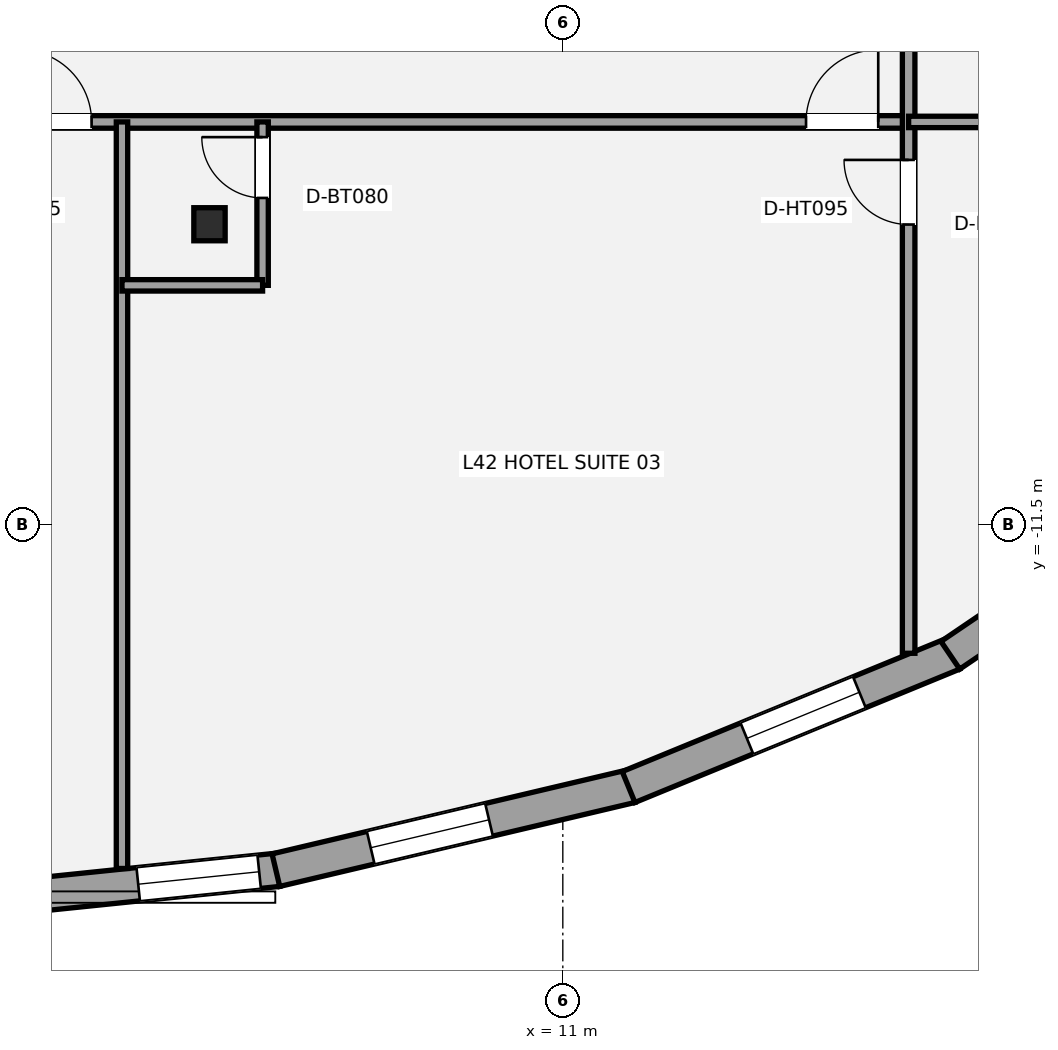
"""IFC4 building model, lengths in metres.
Left out: names, types, materials, properties, quantities, classifications, styles, units other than length and angle.
Written with IfcOpenShell. Run it as: python <this file> out.ifc"""

import sys

from ifc_helpers import new_model, si_unit, direction, frame, frame_2d, origin, origin_2d, place, context, subcontext, project, spatial, rectangle, i_section, extrude, element, fill, save


model = new_model("IFC4")
c1 = context("Model", 3, precision=1e-05, world=origin(), true_north=direction((0.0, 1.0)))
c2 = subcontext(c1, "Body", "Model", "MODEL_VIEW")
j1 = project(units=[si_unit("LENGTHUNIT", "METRE"), si_unit("PLANEANGLEUNIT", "RADIAN")], contexts=[c1])
p1 = place(None, origin())
s1 = spatial("IfcSite", under=j1, at=p1, CompositionType="ELEMENT")
p2 = place(p1, origin())
s2 = spatial("IfcBuilding", under=s1, at=p2, CompositionType="ELEMENT")
p3 = place(p2, frame((0.0, 0.0, 156.6)))
s3 = spatial("IfcBuildingStorey", under=s2, at=p3, CompositionType="ELEMENT", Elevation=156.6)
p4 = place(p3, frame((6.351, -7.546, 0.0), z_axis=(0.0, 0.0, 1.0), x_axis=(1.0, 0.0, 0.0)))
e1 = element("IfcColumn", 1, at=p4, inside=s3, PredefinedType="COLUMN", context=c2, shape_type="SweptSolid", body=[
    extrude(i_section(OverallWidth=0.412, OverallDepth=0.435, WebThickness=0.036, FlangeThickness=0.057, at=origin_2d()), origin(), (0.0, 0.0, 1.0), 3.2),
])
p5 = place(p3, frame((7.253, -16.039, 0.0), z_axis=(0.0, 0.0, 1.0), x_axis=(-0.994718319881, -0.10264240884, 0.0)))
e2 = element("IfcWall", 2, at=p5, inside=s3, PredefinedType="STANDARD", context=c2, shape_type="SweptSolid", body=[
    extrude(rectangle(XDim=4.866, YDim=0.44, at=frame_2d((2.433, 0.0))), origin(), (0.0, 0.0, 1.0), 2.315),
])
p6 = place(p5, frame((0.25, 0.0, 0.58)))
e3 = element("IfcOpeningElement", 3, at=p6, cuts=e2, PredefinedType="OPENING", context=c2, shape_type="SweptSolid", body=[
    extrude(rectangle(XDim=1.6, YDim=1.55, at=frame_2d((0.8, 0.775))), frame((0.0, 0.23, 0.0), z_axis=(0.0, -1.0, 0.0), x_axis=(1.0, 0.0, 0.0)), (0.0, 0.0, 1.0), 0.46),
])
p7 = place(p3, frame((11.898, -14.939, 0.0), z_axis=(0.0, 0.0, 1.0), x_axis=(-0.973201371538, -0.229954539936, 0.0)))
e4 = element("IfcWall", 4, at=p7, inside=s3, PredefinedType="STANDARD", context=c2, shape_type="SweptSolid", body=[
    extrude(rectangle(XDim=4.802, YDim=0.44, at=frame_2d((2.401, 0.0))), origin(), (0.0, 0.0, 1.0), 2.315),
])
p8 = place(p7, frame((1.921, 0.0, 0.58)))
e5 = element("IfcOpeningElement", 5, at=p8, cuts=e4, PredefinedType="OPENING", context=c2, shape_type="SweptSolid", body=[
    extrude(rectangle(XDim=1.6, YDim=1.55, at=frame_2d((0.8, 0.775))), frame((0.0, 0.23, 0.0), z_axis=(0.0, -1.0, 0.0), x_axis=(1.0, 0.0, 0.0)), (0.0, 0.0, 1.0), 0.46),
])
p9 = place(p3, frame((16.138, -13.195, 0.0), z_axis=(0.0, 0.0, 1.0), x_axis=(-0.925044361302, -0.3798590918, 0.0)))
e6 = element("IfcWall", 6, at=p9, inside=s3, PredefinedType="STANDARD", context=c2, shape_type="SweptSolid", body=[
    extrude(rectangle(XDim=4.619, YDim=0.44, at=frame_2d((2.31, 0.0))), origin(), (0.0, 0.0, 1.0), 2.315),
])
p10 = place(p9, frame((1.337, 0.0, 0.58)))
e7 = element("IfcOpeningElement", 7, at=p10, cuts=e6, PredefinedType="OPENING", context=c2, shape_type="SweptSolid", body=[
    extrude(rectangle(XDim=1.6, YDim=1.55, at=frame_2d((0.8, 0.775))), frame((0.0, 0.23, 0.0), z_axis=(0.0, -1.0, 0.0), x_axis=(1.0, 0.0, 0.0)), (0.0, 0.0, 1.0), 0.46),
])
p11 = place(p3, frame((19.643, -10.814, 0.0), z_axis=(0.0, 0.0, 1.0), x_axis=(-0.827771778383, -0.561064954272, 0.0)))
e8 = element("IfcWall", 8, at=p11, inside=s3, PredefinedType="STANDARD", context=c2, shape_type="SweptSolid", body=[
    extrude(rectangle(XDim=4.282, YDim=0.44, at=frame_2d((2.141, 0.0))), origin(), (0.0, 0.0, 1.0), 2.315),
])
p12 = place(p11, frame((1.837, 0.0, 0.58)))
e9 = element("IfcOpeningElement", 9, at=p12, cuts=e8, PredefinedType="OPENING", context=c2, shape_type="SweptSolid", body=[
    extrude(rectangle(XDim=1.6, YDim=1.55, at=frame_2d((0.8, 0.775))), frame((0.0, 0.23, 0.0), z_axis=(0.0, -1.0, 0.0), x_axis=(1.0, 0.0, 0.0)), (0.0, 0.0, 1.0), 0.46),
])
p13 = place(p3, frame((-15.75, -6.2, 0.0), z_axis=(0.0, 0.0, 1.0), x_axis=(1.0, 0.0, 0.0)))
e10 = element("IfcWall", 10, at=p13, inside=s3, PredefinedType="PARTITIONING", context=c2, shape_type="SweptSolid", body=[
    extrude(rectangle(XDim=31.3, YDim=0.165, at=frame_2d((15.65, 0.0))), origin(), (0.0, 0.0, 1.0), 2.398),
])
p14 = place(p13, frame((8.12, 0.0, 0.0)))
e11 = element("IfcOpeningElement", 11, at=p14, cuts=e10, PredefinedType="OPENING", context=c2, shape_type="SweptSolid", body=[
    extrude(rectangle(XDim=0.95, YDim=2.15, at=frame_2d((0.475, 1.075))), frame((0.0, 0.093, 0.0), z_axis=(0.0, -1.0, 0.0), x_axis=(1.0, 0.0, 0.0)), (0.0, 0.0, 1.0), 0.185),
])
p15 = place(p13, frame((19.6, 0.0, 0.0)))
e12 = element("IfcOpeningElement", 12, at=p15, cuts=e10, PredefinedType="OPENING", context=c2, shape_type="SweptSolid", body=[
    extrude(rectangle(XDim=0.95, YDim=2.15, at=frame_2d((0.475, 1.075))), frame((0.0, 0.093, 0.0), z_axis=(0.0, -1.0, 0.0), x_axis=(1.0, 0.0, 0.0)), (0.0, 0.0, 1.0), 0.185),
])
p16 = place(p13, frame((29.95, 0.0, 0.0)))
e13 = element("IfcOpeningElement", 13, at=p16, cuts=e10, PredefinedType="OPENING", context=c2, shape_type="SweptSolid", body=[
    extrude(rectangle(XDim=0.95, YDim=2.15, at=frame_2d((0.475, 1.075))), frame((0.0, 0.093, 0.0), z_axis=(0.0, -1.0, 0.0), x_axis=(1.0, 0.0, 0.0)), (0.0, 0.0, 1.0), 0.185),
])
p17 = place(p3, frame((15.55, -13.191, 0.0), z_axis=(0.0, 0.0, 1.0), x_axis=(0.0, 1.0, 0.0)))
e14 = element("IfcWall", 14, at=p17, inside=s3, PredefinedType="PARTITIONING", context=c2, shape_type="SweptSolid", body=[
    extrude(rectangle(XDim=20.741, YDim=0.165, at=frame_2d((10.37, 0.0))), origin(), (0.0, 0.0, 1.0), 2.473),
])
p18 = place(p17, frame((5.641, 0.0, 0.0)))
e15 = element("IfcOpeningElement", 15, at=p18, cuts=e14, PredefinedType="OPENING", context=c2, shape_type="SweptSolid", body=[
    extrude(rectangle(XDim=0.85, YDim=2.1, at=frame_2d((0.425, 1.05))), frame((0.0, 0.093, 0.0), z_axis=(0.0, -1.0, 0.0), x_axis=(1.0, 0.0, 0.0)), (0.0, 0.0, 1.0), 0.185),
])
p19 = place(p17, frame((13.641, 0.0, 0.0)))
e16 = element("IfcOpeningElement", 16, at=p19, cuts=e14, PredefinedType="OPENING", context=c2, shape_type="SweptSolid", body=[
    extrude(rectangle(XDim=0.95, YDim=2.15, at=frame_2d((0.475, 1.075))), frame((0.0, 0.093, 0.0), z_axis=(0.0, -1.0, 0.0), x_axis=(1.0, 0.0, 0.0)), (0.0, 0.0, 1.0), 0.185),
])
p20 = place(p17, frame((19.391, 0.0, 0.0)))
e17 = element("IfcOpeningElement", 17, at=p20, cuts=e14, PredefinedType="OPENING", context=c2, shape_type="SweptSolid", body=[
    extrude(rectangle(XDim=0.95, YDim=2.15, at=frame_2d((0.475, 1.075))), frame((0.0, 0.093, 0.0), z_axis=(0.0, -1.0, 0.0), x_axis=(1.0, 0.0, 0.0)), (0.0, 0.0, 1.0), 0.185),
])
p21 = place(p3, frame((15.55, -6.2, 0.0), z_axis=(0.0, 0.0, 1.0), x_axis=(1.0, 0.0, 0.0)))
e18 = element("IfcWall", 18, at=p21, inside=s3, PredefinedType="PLUMBINGWALL", context=c2, shape_type="SweptSolid", body=[
    extrude(rectangle(XDim=7.278, YDim=0.15, at=frame_2d((3.639, 0.0))), origin(), (0.0, 0.0, 1.0), 2.473),
])
p22 = place(p3, frame((5.2, -16.022, 0.0), z_axis=(0.0, 0.0, 1.0), x_axis=(0.0, 1.0, 0.0)))
e19 = element("IfcWall", 19, at=p22, inside=s3, PredefinedType="PLUMBINGWALL", context=c2, shape_type="SweptSolid", body=[
    extrude(rectangle(XDim=9.822, YDim=0.15, at=frame_2d((4.911, 0.0))), origin(), (0.0, 0.0, 1.0), 2.473),
])
p23 = place(p3, frame((7.05, -8.35, 0.0), z_axis=(0.0, 0.0, 1.0), x_axis=(0.0, 1.0, 0.0)))
e20 = element("IfcWall", 20, at=p23, inside=s3, PredefinedType="PLUMBINGWALL", context=c2, shape_type="SweptSolid", body=[
    extrude(rectangle(XDim=2.15, YDim=0.15, at=frame_2d((1.075, 0.0))), origin(), (0.0, 0.0, 1.0), 3.02),
])
p24 = place(p23, frame((1.15, 0.0, 0.0)))
e21 = element("IfcOpeningElement", 21, at=p24, cuts=e20, PredefinedType="OPENING", context=c2, shape_type="SweptSolid", body=[
    extrude(rectangle(XDim=0.8, YDim=2.1, at=frame_2d((0.4, 1.05))), frame((0.0, 0.085, 0.0), z_axis=(0.0, -1.0, 0.0), x_axis=(1.0, 0.0, 0.0)), (0.0, 0.0, 1.0), 0.17),
])
p25 = place(p3, frame((5.2, -8.35, 0.0), z_axis=(0.0, 0.0, 1.0), x_axis=(1.0, 0.0, 0.0)))
e22 = element("IfcWall", 22, at=p25, inside=s3, PredefinedType="PLUMBINGWALL", context=c2, shape_type="SweptSolid", body=[
    extrude(rectangle(XDim=1.85, YDim=0.15, at=frame_2d((0.925, 0.0))), origin(), (0.0, 0.0, 1.0), 3.02),
])
p26 = place(p6, origin())
e23 = element("IfcWindow", 23, at=p26, inside=s3, PartitioningType="SINGLE_PANEL", PredefinedType="WINDOW", context=c2, shape_type="SweptSolid", body=[
    extrude(rectangle(XDim=1.6, YDim=1.55, at=frame_2d((0.8, 0.775))), frame((0.0, -0.01, 0.0), z_axis=(0.0, -1.0, 0.0), x_axis=(1.0, 0.0, 0.0)), (0.0, 0.0, 1.0), 0.06),
])
fill(e3, e23)
p27 = place(p8, origin())
e24 = element("IfcWindow", 24, at=p27, inside=s3, PartitioningType="SINGLE_PANEL", PredefinedType="WINDOW", context=c2, shape_type="SweptSolid", body=[
    extrude(rectangle(XDim=1.6, YDim=1.55, at=frame_2d((0.8, 0.775))), frame((0.0, -0.01, 0.0), z_axis=(0.0, -1.0, 0.0), x_axis=(1.0, 0.0, 0.0)), (0.0, 0.0, 1.0), 0.06),
])
fill(e5, e24)
p28 = place(p10, origin())
e25 = element("IfcWindow", 25, at=p28, inside=s3, PartitioningType="SINGLE_PANEL", PredefinedType="WINDOW", context=c2, shape_type="SweptSolid", body=[
    extrude(rectangle(XDim=1.6, YDim=1.55, at=frame_2d((0.8, 0.775))), frame((0.0, -0.01, 0.0), z_axis=(0.0, -1.0, 0.0), x_axis=(1.0, 0.0, 0.0)), (0.0, 0.0, 1.0), 0.06),
])
fill(e7, e25)
p29 = place(p18, origin())
e26 = element("IfcDoor", 26, at=p29, inside=s3, OperationType="SINGLE_SWING_RIGHT", PredefinedType="DOOR", context=c2, shape_type="SweptSolid", body=[
    extrude(rectangle(XDim=0.85, YDim=2.1, at=frame_2d((0.425, 1.05))), frame((0.0, 0.025, 0.0), z_axis=(0.0, -1.0, 0.0), x_axis=(1.0, 0.0, 0.0)), (0.0, 0.0, 1.0), 0.05),
])
fill(e15, e26)
p30 = place(p15, origin())
e27 = element("IfcDoor", 27, at=p30, inside=s3, OperationType="SINGLE_SWING_LEFT", PredefinedType="DOOR", context=c2, shape_type="SweptSolid", body=[
    extrude(rectangle(XDim=0.95, YDim=2.15, at=frame_2d((0.475, 1.075))), frame((0.0, 0.025, 0.0), z_axis=(0.0, -1.0, 0.0), x_axis=(1.0, 0.0, 0.0)), (0.0, 0.0, 1.0), 0.05),
])
fill(e12, e27)
p31 = place(p16, origin())
e28 = element("IfcDoor", 28, at=p31, inside=s3, OperationType="SINGLE_SWING_RIGHT", PredefinedType="DOOR", context=c2, shape_type="SweptSolid", body=[
    extrude(rectangle(XDim=0.95, YDim=2.15, at=frame_2d((0.475, 1.075))), frame((0.0, 0.025, 0.0), z_axis=(0.0, -1.0, 0.0), x_axis=(1.0, 0.0, 0.0)), (0.0, 0.0, 1.0), 0.05),
])
fill(e13, e28)
p32 = place(p24, origin())
e29 = element("IfcDoor", 29, at=p32, inside=s3, OperationType="SINGLE_SWING_RIGHT", PredefinedType="DOOR", context=c2, shape_type="SweptSolid", body=[
    extrude(rectangle(XDim=0.8, YDim=2.1, at=frame_2d((0.4, 1.05))), frame((0.0, 0.025, 0.0), z_axis=(0.0, -1.0, 0.0), x_axis=(1.0, 0.0, 0.0)), (0.0, 0.0, 1.0), 0.05),
])
fill(e21, e29)
save(model, sys.argv[1])
